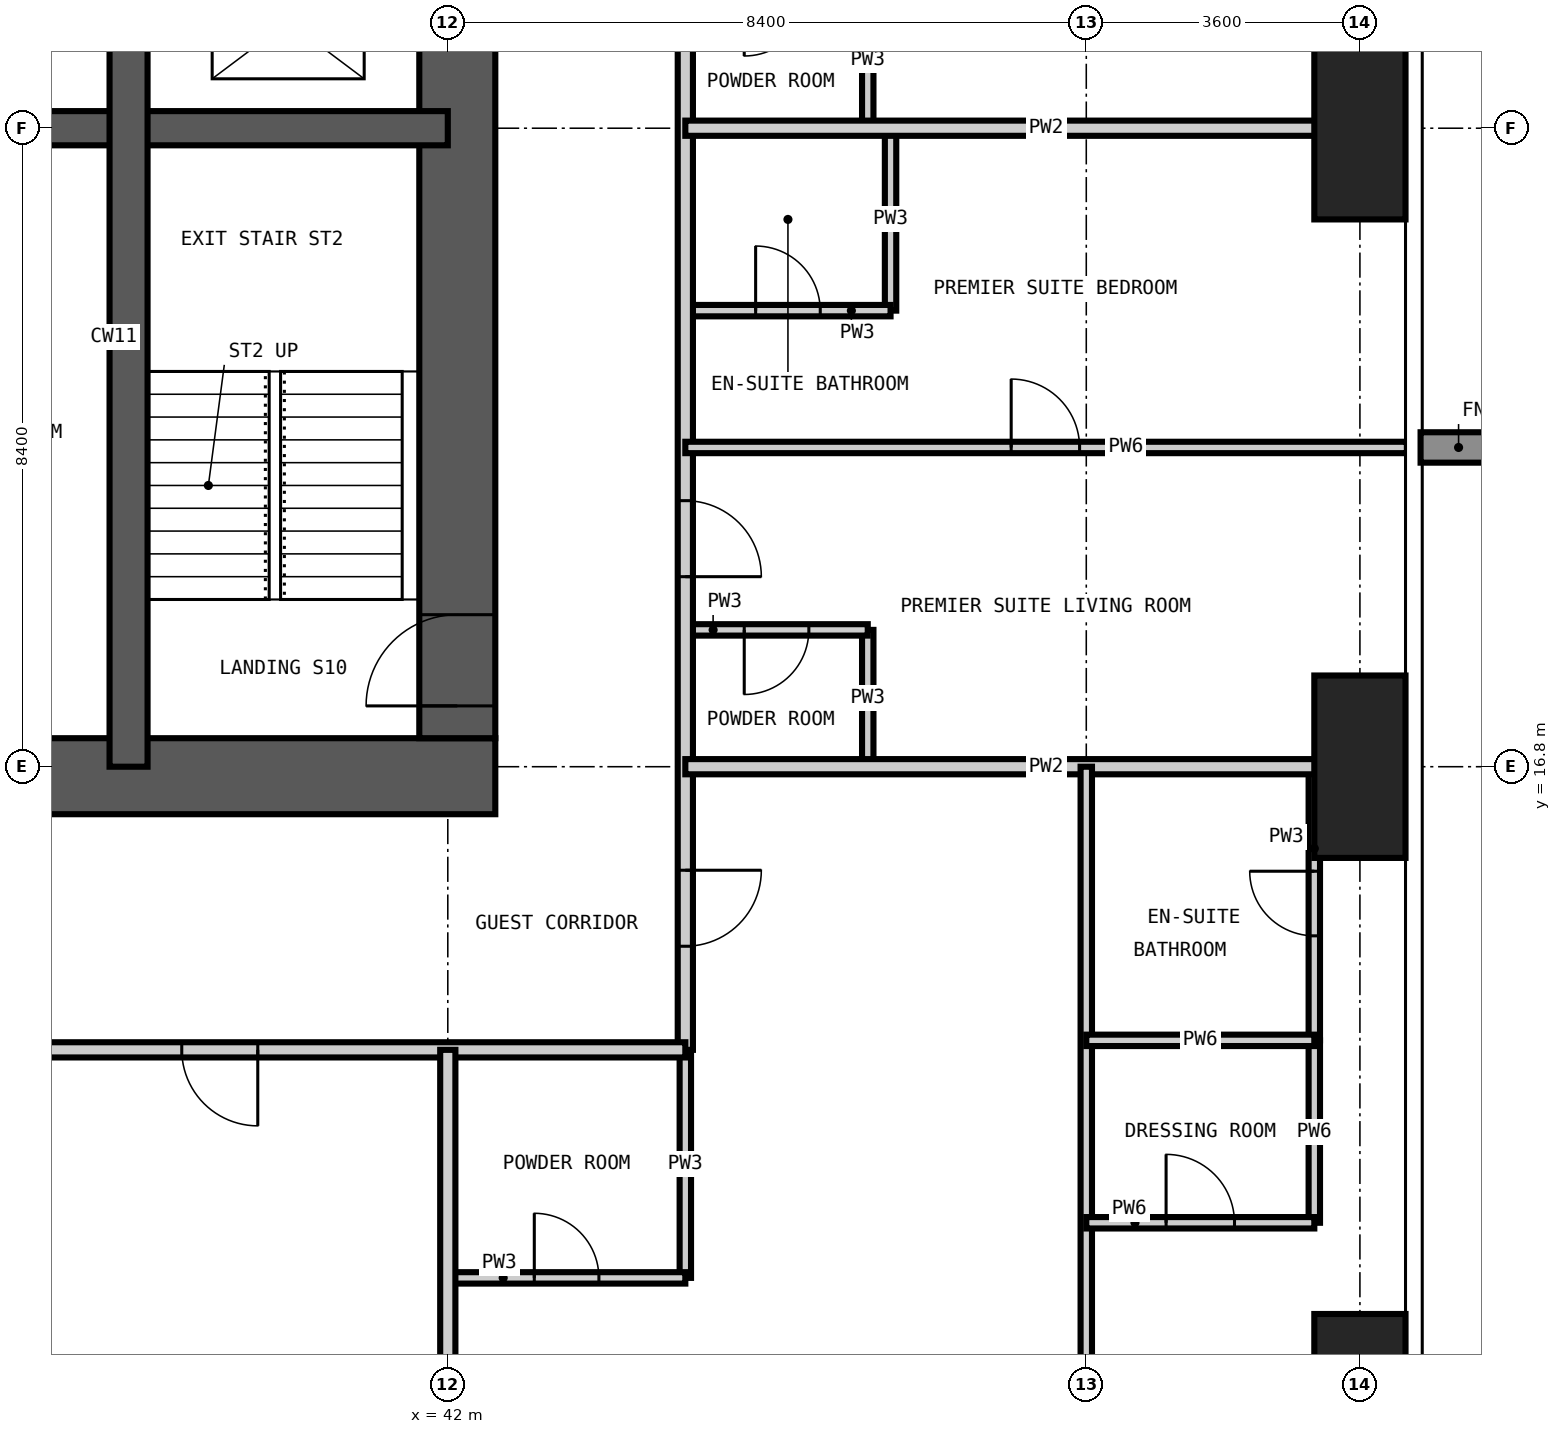
"""IFC4 building model, lengths in metres.
Left out: names, types, materials, properties, quantities, classifications, styles, units other than length and angle.
Written with IfcOpenShell. Run it as: python <this file> out.ifc"""

import sys

from ifc_helpers import new_model, si_unit, direction, frame, frame_2d, origin, origin_2d, place, context, subcontext, project, spatial, rectangle, extrude, element, fill, save


model = new_model("IFC4")
c1 = context("Model", 3, precision=1e-05, world=origin(), true_north=direction((0.0, 1.0)))
c2 = subcontext(c1, "Body", "Model", "MODEL_VIEW")
j1 = project(units=[si_unit("LENGTHUNIT", "METRE"), si_unit("PLANEANGLEUNIT", "RADIAN")], contexts=[c1])
p1 = place(None, origin())
s1 = spatial("IfcSite", under=j1, at=p1, CompositionType="ELEMENT")
p2 = place(p1, origin())
s2 = spatial("IfcBuilding", under=s1, at=p2, CompositionType="ELEMENT")
p3 = place(p2, frame((0.0, 0.0, 118.8)))
s3 = spatial("IfcBuildingStorey", under=s2, at=p3, CompositionType="ELEMENT", Elevation=118.8)
for number, where, z_axis, x_axis in (
    (1, (54.0, 8.4, -0.35), (0.0, 0.0, 1.0), (1.0, 0.0, 0.0)),
    (2, (54.0, 16.8, -0.35), (0.0, 0.0, 1.0), (1.0, 0.0, 0.0)),
    (3, (54.0, 25.2, -0.35), (0.0, 0.0, 1.0), (1.0, 0.0, 0.0)),
):
    element("IfcColumn", number, at=place(p3, frame(where, z_axis=z_axis, x_axis=x_axis)), inside=s3, PredefinedType="COLUMN", context=c2, shape_type="SweptSolid", body=[
        extrude(rectangle(XDim=1.2, YDim=2.4, at=origin_2d()), origin(), (0.0, 0.0, 1.0), 3.6),
    ])
p4 = place(p3, frame((16.175, 16.675, -0.35), z_axis=(0.0, 0.0, 1.0), x_axis=(1.0, 0.0, 0.0)))
e4 = element("IfcWall", 4, at=p4, inside=s3, PredefinedType="SHEAR", context=c2, shape_type="SweptSolid", body=[
    extrude(rectangle(XDim=26.45, YDim=1.0, at=frame_2d((13.225, 0.0))), origin(), (0.0, 0.0, 1.0), 3.6),
])
p5 = place(p4, frame((12.725, 0.0, 0.35)))
e5 = element("IfcOpeningElement", 5, at=p5, cuts=e4, PredefinedType="OPENING", context=c2, shape_type="SweptSolid", body=[
    extrude(rectangle(XDim=1.0, YDim=2.1, at=frame_2d((0.5, 1.05))), frame((0.0, 0.51, 0.0), z_axis=(0.0, -1.0, 0.0), x_axis=(1.0, 0.0, 0.0)), (0.0, 0.0, 1.0), 1.02),
])
p6 = place(p4, frame((19.025, 0.0, 0.35)))
e6 = element("IfcOpeningElement", 6, at=p6, cuts=e4, PredefinedType="OPENING", context=c2, shape_type="SweptSolid", body=[
    extrude(rectangle(XDim=1.0, YDim=2.1, at=frame_2d((0.5, 1.05))), frame((0.0, 0.51, 0.0), z_axis=(0.0, -1.0, 0.0), x_axis=(1.0, 0.0, 0.0)), (0.0, 0.0, 1.0), 1.02),
])
p7 = place(p3, frame((42.125, 17.175, -0.35), z_axis=(0.0, 0.0, 1.0), x_axis=(0.0, 1.0, 0.0)))
e7 = element("IfcWall", 7, at=p7, inside=s3, PredefinedType="SHEAR", context=c2, shape_type="SweptSolid", body=[
    extrude(rectangle(XDim=24.45, YDim=1.0, at=frame_2d((12.225, 0.0))), origin(), (0.0, 0.0, 1.0), 3.6),
])
p8 = place(p7, frame((0.425, 0.0, 0.35)))
e8 = element("IfcOpeningElement", 8, at=p8, cuts=e7, PredefinedType="OPENING", context=c2, shape_type="SweptSolid", body=[
    extrude(rectangle(XDim=1.2, YDim=2.2, at=frame_2d((0.6, 1.1))), frame((0.0, 0.51, 0.0), z_axis=(0.0, -1.0, 0.0), x_axis=(1.0, 0.0, 0.0)), (0.0, 0.0, 1.0), 1.02),
])
p9 = place(p7, frame((11.325, 0.0, 0.35)))
e9 = element("IfcOpeningElement", 9, at=p9, cuts=e7, PredefinedType="OPENING", context=c2, shape_type="SweptSolid", body=[
    extrude(rectangle(XDim=1.8, YDim=2.2, at=frame_2d((0.9, 1.1))), frame((0.0, 0.51, 0.0), z_axis=(0.0, -1.0, 0.0), x_axis=(1.0, 0.0, 0.0)), (0.0, 0.0, 1.0), 1.02),
])
p10 = place(p7, frame((20.125, 0.0, 0.35)))
e10 = element("IfcOpeningElement", 10, at=p10, cuts=e7, PredefinedType="OPENING", context=c2, shape_type="SweptSolid", body=[
    extrude(rectangle(XDim=1.0, YDim=2.1, at=frame_2d((0.5, 1.05))), frame((0.0, 0.51, 0.0), z_axis=(0.0, -1.0, 0.0), x_axis=(1.0, 0.0, 0.0)), (0.0, 0.0, 1.0), 1.02),
])
p11 = place(p3, frame((16.8, 25.2, -0.35), z_axis=(0.0, 0.0, 1.0), x_axis=(1.0, 0.0, 0.0)))
e11 = element("IfcWall", 11, at=p11, inside=s3, PredefinedType="SHEAR", context=c2, shape_type="SweptSolid", body=[
    extrude(rectangle(XDim=25.2, YDim=0.45, at=frame_2d((12.6, 0.0))), origin(), (0.0, 0.0, 1.0), 3.6),
])
p12 = place(p3, frame((37.8, 16.8, -0.35), z_axis=(0.0, 0.0, 1.0), x_axis=(0.0, 1.0, 0.0)))
e12 = element("IfcWall", 12, at=p12, inside=s3, PredefinedType="SHEAR", context=c2, shape_type="SweptSolid", body=[
    extrude(rectangle(XDim=11.2, YDim=0.5, at=frame_2d((5.6, 0.0))), origin(), (0.0, 0.0, 1.0), 3.6),
])
p13 = place(p3, frame((45.125, 10.075, 0.0), z_axis=(0.0, 0.0, 1.0), x_axis=(0.0, 1.0, 0.0)))
e13 = element("IfcWall", 13, at=p13, inside=s3, PredefinedType="PARTITIONING", context=c2, shape_type="SweptSolid", body=[
    extrude(rectangle(XDim=3.0, YDim=0.15, at=frame_2d((1.5, 0.0))), origin(), (0.0, 0.0, 1.0), 3.25),
])
for number, where, z_axis, x_axis in (
    (14, (47.525, 16.8, 0.0), (0.0, 0.0, 1.0), (0.0, 1.0, 0.0)),
    (15, (47.525, 25.2, 0.0), (0.0, 0.0, 1.0), (0.0, 1.0, 0.0)),
):
    element("IfcWall", number, at=place(p3, frame(where, z_axis=z_axis, x_axis=x_axis)), inside=s3, PredefinedType="PARTITIONING", context=c2, shape_type="SweptSolid", body=[
        extrude(rectangle(XDim=1.8, YDim=0.15, at=frame_2d((0.9, 0.0))), origin(), (0.0, 0.0, 1.0), 3.25),
    ])
p14 = place(p3, frame((47.825, 22.8, 0.0), z_axis=(0.0, 0.0, 1.0), x_axis=(0.0, 1.0, 0.0)))
e16 = element("IfcWall", 16, at=p14, inside=s3, PredefinedType="PARTITIONING", context=c2, shape_type="SweptSolid", body=[
    extrude(rectangle(XDim=2.4, YDim=0.15, at=frame_2d((1.2, 0.0))), origin(), (0.0, 0.0, 1.0), 3.25),
])
p15 = place(p3, frame((53.4, 13.2, 0.0), z_axis=(0.0, 0.0, 1.0), x_axis=(0.0, 1.0, 0.0)))
e17 = element("IfcWall", 17, at=p15, inside=s3, PredefinedType="PARTITIONING", context=c2, shape_type="SweptSolid", body=[
    extrude(rectangle(XDim=3.6, YDim=0.15, at=frame_2d((1.8, 0.0))), origin(), (0.0, 0.0, 1.0), 3.25),
])
p16 = place(p15, frame((1.375, 0.0, 0.0)))
e18 = element("IfcOpeningElement", 18, at=p16, cuts=e17, PredefinedType="OPENING", context=c2, shape_type="SweptSolid", body=[
    extrude(rectangle(XDim=0.85, YDim=2.1, at=frame_2d((0.425, 1.05))), frame((0.0, 0.085, 0.0), z_axis=(0.0, -1.0, 0.0), x_axis=(1.0, 0.0, 0.0)), (0.0, 0.0, 1.0), 0.17),
])
p17 = place(p3, frame((42.0, 10.075, 0.0), z_axis=(0.0, 0.0, 1.0), x_axis=(1.0, 0.0, 0.0)))
e19 = element("IfcWall", 19, at=p17, inside=s3, PredefinedType="PARTITIONING", context=c2, shape_type="SweptSolid", body=[
    extrude(rectangle(XDim=3.125, YDim=0.15, at=frame_2d((1.562, 0.0))), origin(), (0.0, 0.0, 1.0), 3.25),
])
p18 = place(p17, frame((1.138, 0.0, 0.0)))
e20 = element("IfcOpeningElement", 20, at=p18, cuts=e19, PredefinedType="OPENING", context=c2, shape_type="SweptSolid", body=[
    extrude(rectangle(XDim=0.85, YDim=2.1, at=frame_2d((0.425, 1.05))), frame((0.0, 0.085, 0.0), z_axis=(0.0, -1.0, 0.0), x_axis=(1.0, 0.0, 0.0)), (0.0, 0.0, 1.0), 0.17),
])
p19 = place(p3, frame((45.125, 18.6, 0.0), z_axis=(0.0, 0.0, 1.0), x_axis=(1.0, 0.0, 0.0)))
e21 = element("IfcWall", 21, at=p19, inside=s3, PredefinedType="PARTITIONING", context=c2, shape_type="SweptSolid", body=[
    extrude(rectangle(XDim=2.4, YDim=0.15, at=frame_2d((1.2, 0.0))), origin(), (0.0, 0.0, 1.0), 3.25),
])
p20 = place(p19, frame((0.775, 0.0, 0.0)))
e22 = element("IfcOpeningElement", 22, at=p20, cuts=e21, PredefinedType="OPENING", context=c2, shape_type="SweptSolid", body=[
    extrude(rectangle(XDim=0.85, YDim=2.1, at=frame_2d((0.425, 1.05))), frame((0.0, 0.085, 0.0), z_axis=(0.0, -1.0, 0.0), x_axis=(1.0, 0.0, 0.0)), (0.0, 0.0, 1.0), 0.17),
])
p21 = place(p3, frame((45.125, 22.8, 0.0), z_axis=(0.0, 0.0, 1.0), x_axis=(1.0, 0.0, 0.0)))
e23 = element("IfcWall", 23, at=p21, inside=s3, PredefinedType="PARTITIONING", context=c2, shape_type="SweptSolid", body=[
    extrude(rectangle(XDim=2.7, YDim=0.15, at=frame_2d((1.35, 0.0))), origin(), (0.0, 0.0, 1.0), 3.25),
])
p22 = place(p21, frame((0.925, 0.0, 0.0)))
e24 = element("IfcOpeningElement", 24, at=p22, cuts=e23, PredefinedType="OPENING", context=c2, shape_type="SweptSolid", body=[
    extrude(rectangle(XDim=0.85, YDim=2.1, at=frame_2d((0.425, 1.05))), frame((0.0, 0.085, 0.0), z_axis=(0.0, -1.0, 0.0), x_axis=(1.0, 0.0, 0.0)), (0.0, 0.0, 1.0), 0.17),
])
p23 = place(p3, frame((45.125, 44.525, 0.0), z_axis=(0.0, 0.0, 1.0), x_axis=(0.0, -1.0, 0.0)))
e25 = element("IfcWall", 25, at=p23, inside=s3, PredefinedType="PARTITIONING", context=c2, shape_type="SweptSolid", body=[
    extrude(rectangle(XDim=31.45, YDim=0.2, at=frame_2d((15.725, 0.0))), origin(), (0.0, 0.0, 1.0), 3.25),
])
p24 = place(p23, frame((24.225, 0.0, 0.0)))
e26 = element("IfcOpeningElement", 26, at=p24, cuts=e25, PredefinedType="OPENING", context=c2, shape_type="SweptSolid", body=[
    extrude(rectangle(XDim=1.0, YDim=2.2, at=frame_2d((0.5, 1.1))), frame((0.0, 0.11, 0.0), z_axis=(0.0, -1.0, 0.0), x_axis=(1.0, 0.0, 0.0)), (0.0, 0.0, 1.0), 0.22),
])
p25 = place(p23, frame((15.825, 0.0, 0.0)))
e27 = element("IfcOpeningElement", 27, at=p25, cuts=e25, PredefinedType="OPENING", context=c2, shape_type="SweptSolid", body=[
    extrude(rectangle(XDim=1.0, YDim=2.2, at=frame_2d((0.5, 1.1))), frame((0.0, 0.11, 0.0), z_axis=(0.0, -1.0, 0.0), x_axis=(1.0, 0.0, 0.0)), (0.0, 0.0, 1.0), 0.22),
])
p26 = place(p23, frame((7.425, 0.0, 0.0)))
e28 = element("IfcOpeningElement", 28, at=p26, cuts=e25, PredefinedType="OPENING", context=c2, shape_type="SweptSolid", body=[
    extrude(rectangle(XDim=1.0, YDim=2.2, at=frame_2d((0.5, 1.1))), frame((0.0, 0.11, 0.0), z_axis=(0.0, -1.0, 0.0), x_axis=(1.0, 0.0, 0.0)), (0.0, 0.0, 1.0), 0.22),
])
p27 = place(p23, frame((29.087, 0.0, 0.0)))
e29 = element("IfcOpeningElement", 29, at=p27, cuts=e25, PredefinedType="OPENING", context=c2, shape_type="SweptSolid", body=[
    extrude(rectangle(XDim=1.0, YDim=2.2, at=frame_2d((0.5, 1.1))), frame((0.0, 0.11, 0.0), z_axis=(0.0, -1.0, 0.0), x_axis=(1.0, 0.0, 0.0)), (0.0, 0.0, 1.0), 0.22),
])
p28 = place(p23, frame((0.762, 0.0, 0.0)))
e30 = element("IfcOpeningElement", 30, at=p28, cuts=e25, PredefinedType="OPENING", context=c2, shape_type="SweptSolid", body=[
    extrude(rectangle(XDim=1.0, YDim=2.2, at=frame_2d((0.5, 1.1))), frame((0.0, 0.11, 0.0), z_axis=(0.0, -1.0, 0.0), x_axis=(1.0, 0.0, 0.0)), (0.0, 0.0, 1.0), 0.22),
])
p29 = place(p3, frame((45.125, 13.075, 0.0), z_axis=(0.0, 0.0, 1.0), x_axis=(-1.0, 0.0, 0.0)))
e31 = element("IfcWall", 31, at=p29, inside=s3, PredefinedType="PARTITIONING", context=c2, shape_type="SweptSolid", body=[
    extrude(rectangle(XDim=32.525, YDim=0.2, at=frame_2d((16.262, 0.0))), origin(), (0.0, 0.0, 1.0), 3.25),
])
p30 = place(p29, frame((22.425, 0.0, 0.0)))
e32 = element("IfcOpeningElement", 32, at=p30, cuts=e31, PredefinedType="OPENING", context=c2, shape_type="SweptSolid", body=[
    extrude(rectangle(XDim=1.0, YDim=2.2, at=frame_2d((0.5, 1.1))), frame((0.0, 0.11, 0.0), z_axis=(0.0, -1.0, 0.0), x_axis=(1.0, 0.0, 0.0)), (0.0, 0.0, 1.0), 0.22),
])
p31 = place(p29, frame((14.025, 0.0, 0.0)))
e33 = element("IfcOpeningElement", 33, at=p31, cuts=e31, PredefinedType="OPENING", context=c2, shape_type="SweptSolid", body=[
    extrude(rectangle(XDim=1.0, YDim=2.2, at=frame_2d((0.5, 1.1))), frame((0.0, 0.11, 0.0), z_axis=(0.0, -1.0, 0.0), x_axis=(1.0, 0.0, 0.0)), (0.0, 0.0, 1.0), 0.22),
])
p32 = place(p29, frame((5.625, 0.0, 0.0)))
e34 = element("IfcOpeningElement", 34, at=p32, cuts=e31, PredefinedType="OPENING", context=c2, shape_type="SweptSolid", body=[
    extrude(rectangle(XDim=1.0, YDim=2.2, at=frame_2d((0.5, 1.1))), frame((0.0, 0.11, 0.0), z_axis=(0.0, -1.0, 0.0), x_axis=(1.0, 0.0, 0.0)), (0.0, 0.0, 1.0), 0.22),
])
p33 = place(p3, frame((42.0, -0.018, 0.0), z_axis=(0.0, 0.0, 1.0), x_axis=(0.0, 1.0, 0.0)))
e35 = element("IfcWall", 35, at=p33, inside=s3, PredefinedType="PARTITIONING", context=c2, shape_type="SweptSolid", body=[
    extrude(rectangle(XDim=13.093, YDim=0.2, at=frame_2d((6.546, 0.0))), origin(), (0.0, 0.0, 1.0), 3.25),
])
for number, where, z_axis, x_axis in (
    (36, (45.125, 16.8, 0.0), (0.0, 0.0, 1.0), (1.0, 0.0, 0.0)),
    (37, (45.125, 25.2, 0.0), (0.0, 0.0, 1.0), (1.0, 0.0, 0.0)),
):
    element("IfcWall", number, at=place(p3, frame(where, z_axis=z_axis, x_axis=x_axis)), inside=s3, PredefinedType="PARTITIONING", context=c2, shape_type="SweptSolid", body=[
        extrude(rectangle(XDim=9.493, YDim=0.2, at=frame_2d((4.747, 0.0))), origin(), (0.0, 0.0, 1.0), 3.25),
    ])
p34 = place(p3, frame((50.4, -0.018, 0.0), z_axis=(0.0, 0.0, 1.0), x_axis=(0.0, 1.0, 0.0)))
e38 = element("IfcWall", 38, at=p34, inside=s3, PredefinedType="PARTITIONING", context=c2, shape_type="SweptSolid", body=[
    extrude(rectangle(XDim=16.818, YDim=0.15, at=frame_2d((8.409, 0.0))), origin(), (0.0, 0.0, 1.0), 3.25),
])
p35 = place(p34, frame((5.668, 0.0, 0.0)))
e39 = element("IfcOpeningElement", 39, at=p35, cuts=e38, PredefinedType="OPENING", context=c2, shape_type="SweptSolid", body=[
    extrude(rectangle(XDim=0.9, YDim=2.1, at=frame_2d((0.45, 1.05))), frame((0.0, 0.085, 0.0), z_axis=(0.0, -1.0, 0.0), x_axis=(1.0, 0.0, 0.0)), (0.0, 0.0, 1.0), 0.17),
])
p36 = place(p3, frame((53.4, 10.8, 0.0), z_axis=(0.0, 0.0, 1.0), x_axis=(0.0, 1.0, 0.0)))
e40 = element("IfcWall", 40, at=p36, inside=s3, PredefinedType="PARTITIONING", context=c2, shape_type="SweptSolid", body=[
    extrude(rectangle(XDim=2.4, YDim=0.15, at=frame_2d((1.2, 0.0))), origin(), (0.0, 0.0, 1.0), 3.25),
])
p37 = place(p3, frame((50.4, 10.8, 0.0), z_axis=(0.0, 0.0, 1.0), x_axis=(1.0, 0.0, 0.0)))
e41 = element("IfcWall", 41, at=p37, inside=s3, PredefinedType="PARTITIONING", context=c2, shape_type="SweptSolid", body=[
    extrude(rectangle(XDim=3.0, YDim=0.15, at=frame_2d((1.5, 0.0))), origin(), (0.0, 0.0, 1.0), 3.25),
])
p38 = place(p37, frame((1.05, 0.0, 0.0)))
e42 = element("IfcOpeningElement", 42, at=p38, cuts=e41, PredefinedType="OPENING", context=c2, shape_type="SweptSolid", body=[
    extrude(rectangle(XDim=0.9, YDim=2.1, at=frame_2d((0.45, 1.05))), frame((0.0, 0.085, 0.0), z_axis=(0.0, -1.0, 0.0), x_axis=(1.0, 0.0, 0.0)), (0.0, 0.0, 1.0), 0.17),
])
p39 = place(p3, frame((50.4, 13.2, 0.0), z_axis=(0.0, 0.0, 1.0), x_axis=(1.0, 0.0, 0.0)))
e43 = element("IfcWall", 43, at=p39, inside=s3, PredefinedType="PARTITIONING", context=c2, shape_type="SweptSolid", body=[
    extrude(rectangle(XDim=3.0, YDim=0.15, at=frame_2d((1.5, 0.0))), origin(), (0.0, 0.0, 1.0), 3.25),
])
p40 = place(p3, frame((45.125, 21.0, 0.0), z_axis=(0.0, 0.0, 1.0), x_axis=(1.0, 0.0, 0.0)))
e44 = element("IfcWall", 44, at=p40, inside=s3, PredefinedType="PARTITIONING", context=c2, shape_type="SweptSolid", body=[
    extrude(rectangle(XDim=9.493, YDim=0.15, at=frame_2d((4.747, 0.0))), origin(), (0.0, 0.0, 1.0), 3.25),
])
p41 = place(p40, frame((4.287, 0.0, 0.0)))
e45 = element("IfcOpeningElement", 45, at=p41, cuts=e44, PredefinedType="OPENING", context=c2, shape_type="SweptSolid", body=[
    extrude(rectangle(XDim=0.9, YDim=2.1, at=frame_2d((0.45, 1.05))), frame((0.0, 0.085, 0.0), z_axis=(0.0, -1.0, 0.0), x_axis=(1.0, 0.0, 0.0)), (0.0, 0.0, 1.0), 0.17),
])
p42 = place(p8, origin())
e46 = element("IfcDoor", 46, at=p42, inside=s3, OperationType="SINGLE_SWING_LEFT", PredefinedType="DOOR", context=c2, shape_type="SweptSolid", body=[
    extrude(rectangle(XDim=1.2, YDim=2.2, at=frame_2d((0.6, 1.1))), frame((0.0, 0.025, 0.0), z_axis=(0.0, -1.0, 0.0), x_axis=(1.0, 0.0, 0.0)), (0.0, 0.0, 1.0), 0.05),
])
fill(e8, e46)
p43 = place(p32, origin())
e47 = element("IfcDoor", 47, at=p43, inside=s3, OperationType="SINGLE_SWING_LEFT", PredefinedType="DOOR", context=c2, shape_type="SweptSolid", body=[
    extrude(rectangle(XDim=1.0, YDim=2.2, at=frame_2d((0.5, 1.1))), frame((0.0, 0.025, 0.0), z_axis=(0.0, -1.0, 0.0), x_axis=(1.0, 0.0, 0.0)), (0.0, 0.0, 1.0), 0.05),
])
fill(e34, e47)
p44 = place(p24, origin())
e48 = element("IfcDoor", 48, at=p44, inside=s3, OperationType="SINGLE_SWING_RIGHT", PredefinedType="DOOR", context=c2, shape_type="SweptSolid", body=[
    extrude(rectangle(XDim=1.0, YDim=2.2, at=frame_2d((0.5, 1.1))), frame((0.0, 0.025, 0.0), z_axis=(0.0, -1.0, 0.0), x_axis=(1.0, 0.0, 0.0)), (0.0, 0.0, 1.0), 0.05),
])
fill(e26, e48)
p45 = place(p20, frame((0.85, 0.0, 0.0), z_axis=(0.0, 0.0, 1.0), x_axis=(-1.0, 0.0, 0.0)))
e49 = element("IfcDoor", 49, at=p45, inside=s3, OperationType="SINGLE_SWING_RIGHT", PredefinedType="DOOR", context=c2, shape_type="SweptSolid", body=[
    extrude(rectangle(XDim=0.85, YDim=2.1, at=frame_2d((0.425, 1.05))), frame((0.0, 0.025, 0.0), z_axis=(0.0, -1.0, 0.0), x_axis=(1.0, 0.0, 0.0)), (0.0, 0.0, 1.0), 0.05),
])
fill(e22, e49)
p46 = place(p41, origin())
e50 = element("IfcDoor", 50, at=p46, inside=s3, OperationType="SINGLE_SWING_LEFT", PredefinedType="DOOR", context=c2, shape_type="SweptSolid", body=[
    extrude(rectangle(XDim=0.9, YDim=2.1, at=frame_2d((0.45, 1.05))), frame((0.0, 0.025, 0.0), z_axis=(0.0, -1.0, 0.0), x_axis=(1.0, 0.0, 0.0)), (0.0, 0.0, 1.0), 0.05),
])
fill(e45, e50)
p47 = place(p22, origin())
e51 = element("IfcDoor", 51, at=p47, inside=s3, OperationType="SINGLE_SWING_LEFT", PredefinedType="DOOR", context=c2, shape_type="SweptSolid", body=[
    extrude(rectangle(XDim=0.85, YDim=2.1, at=frame_2d((0.425, 1.05))), frame((0.0, 0.025, 0.0), z_axis=(0.0, -1.0, 0.0), x_axis=(1.0, 0.0, 0.0)), (0.0, 0.0, 1.0), 0.05),
])
fill(e24, e51)
p48 = place(p27, origin())
e52 = element("IfcDoor", 52, at=p48, inside=s3, OperationType="SINGLE_SWING_LEFT", PredefinedType="DOOR", context=c2, shape_type="SweptSolid", body=[
    extrude(rectangle(XDim=1.0, YDim=2.2, at=frame_2d((0.5, 1.1))), frame((0.0, 0.025, 0.0), z_axis=(0.0, -1.0, 0.0), x_axis=(1.0, 0.0, 0.0)), (0.0, 0.0, 1.0), 0.05),
])
fill(e29, e52)
p49 = place(p18, origin())
e53 = element("IfcDoor", 53, at=p49, inside=s3, OperationType="SINGLE_SWING_LEFT", PredefinedType="DOOR", context=c2, shape_type="SweptSolid", body=[
    extrude(rectangle(XDim=0.85, YDim=2.1, at=frame_2d((0.425, 1.05))), frame((0.0, 0.025, 0.0), z_axis=(0.0, -1.0, 0.0), x_axis=(1.0, 0.0, 0.0)), (0.0, 0.0, 1.0), 0.05),
])
fill(e20, e53)
p50 = place(p16, origin())
e54 = element("IfcDoor", 54, at=p50, inside=s3, OperationType="SINGLE_SWING_RIGHT", PredefinedType="DOOR", context=c2, shape_type="SweptSolid", body=[
    extrude(rectangle(XDim=0.85, YDim=2.1, at=frame_2d((0.425, 1.05))), frame((0.0, 0.025, 0.0), z_axis=(0.0, -1.0, 0.0), x_axis=(1.0, 0.0, 0.0)), (0.0, 0.0, 1.0), 0.05),
])
fill(e18, e54)
p51 = place(p38, origin())
e55 = element("IfcDoor", 55, at=p51, inside=s3, OperationType="SINGLE_SWING_LEFT", PredefinedType="DOOR", context=c2, shape_type="SweptSolid", body=[
    extrude(rectangle(XDim=0.9, YDim=2.1, at=frame_2d((0.45, 1.05))), frame((0.0, 0.025, 0.0), z_axis=(0.0, -1.0, 0.0), x_axis=(1.0, 0.0, 0.0)), (0.0, 0.0, 1.0), 0.05),
])
fill(e42, e55)
save(model, sys.argv[1])
